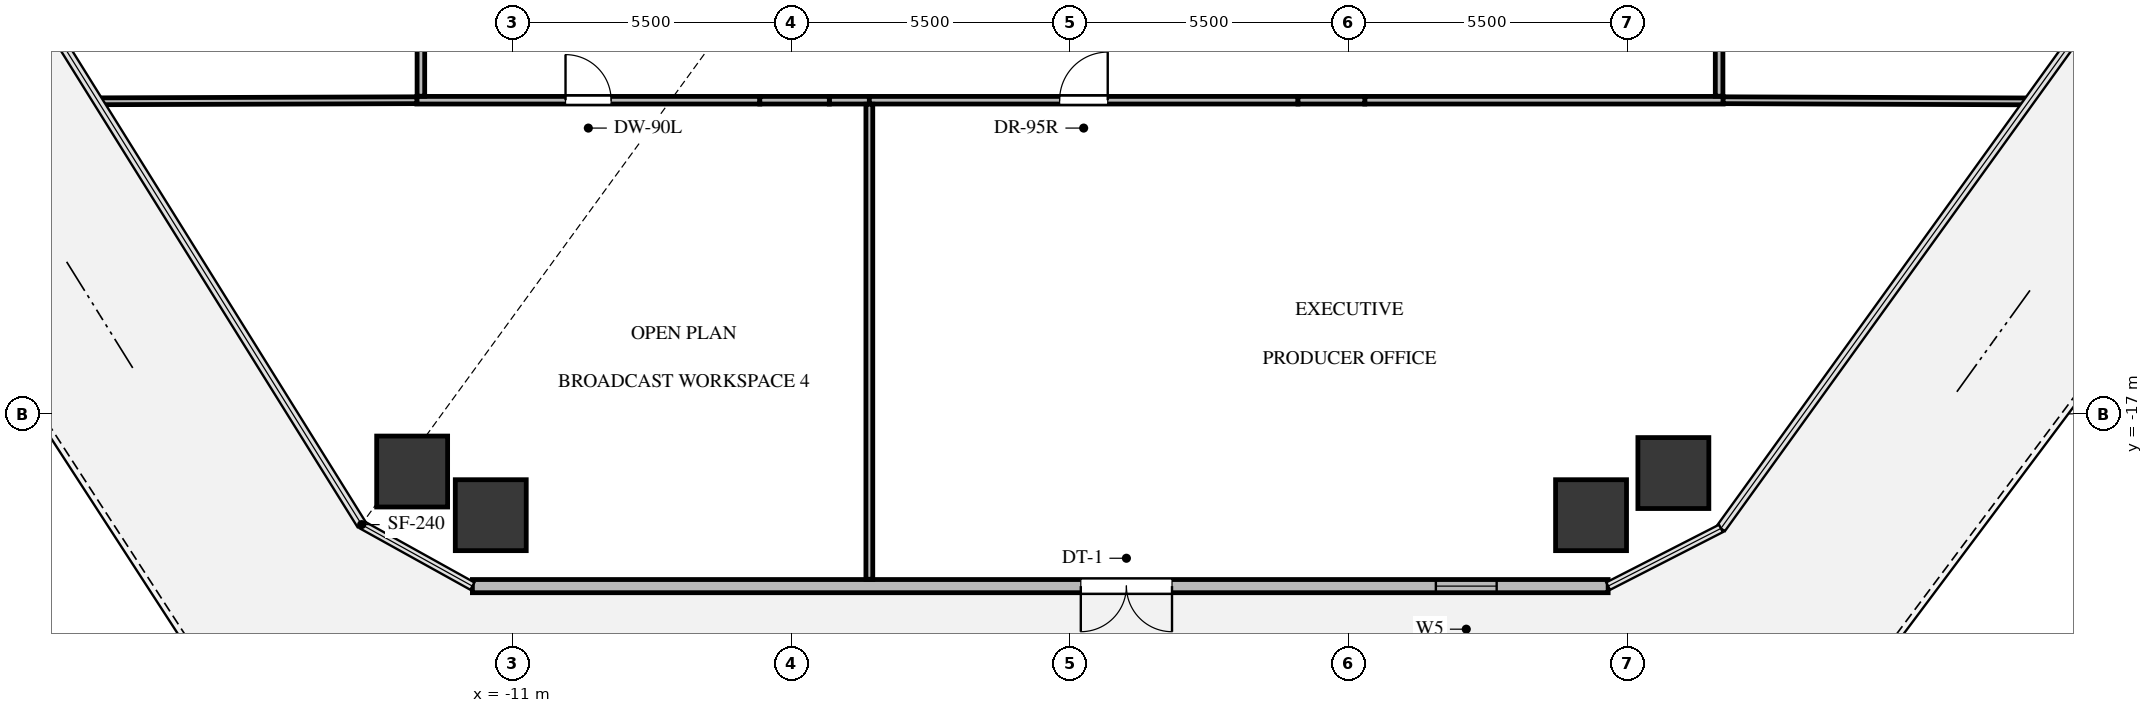
"""IFC4 building model, lengths in metres.
Left out: names, types, materials, properties, quantities, classifications, styles, units other than length and angle.
Written with IfcOpenShell. Run it as: python <this file> out.ifc"""

import sys

from ifc_helpers import new_model, si_unit, direction, frame, frame_2d, origin, origin_2d, place, context, subcontext, project, spatial, rectangle, extrude, source, transform, mapped, element, fill, save


model = new_model("IFC4")
c1 = context("Model", 3, precision=1e-05, world=origin(), true_north=direction((0.0, 1.0)))
c2 = subcontext(c1, "Body", "Model", "MODEL_VIEW")
j1 = project(units=[si_unit("LENGTHUNIT", "METRE"), si_unit("PLANEANGLEUNIT", "RADIAN")], contexts=[c1])
p1 = place(None, origin())
s1 = spatial("IfcSite", under=j1, at=p1, CompositionType="ELEMENT")
p2 = place(p1, origin())
s2 = spatial("IfcBuilding", under=s1, at=p2, CompositionType="ELEMENT")
p3 = place(p2, frame((0.0, 0.0, 32.4)))
s3 = spatial("IfcBuildingStorey", under=s2, at=p3, CompositionType="ELEMENT", Elevation=32.4)
m1 = source(origin(), c2, "Body", "SweptSolid", [
    extrude(rectangle(XDim=1.4, YDim=1.4, at=origin_2d()), origin(), (0.0, 0.0, 1.0), 3.3),
])
for number, where, z_axis, x_axis in (
    (1, (-12.983, -18.138, -0.24), (0.0, 0.0, 1.0), (1.0, 0.0, 0.0)),
    (2, (11.907, -18.168, -0.24), (0.0, 0.0, 1.0), (1.0, 0.0, 0.0)),
    (3, (10.283, -19.0, -0.24), (0.0, 0.0, 1.0), (1.0, 0.0, 0.0)),
    (4, (-11.431, -19.0, -0.24), (0.0, 0.0, 1.0), (1.0, 0.0, 0.0)),
):
    element("IfcColumn", number, at=place(p3, frame(where, z_axis=z_axis, x_axis=x_axis)), inside=s3, PredefinedType="COLUMN", context=c2, shape_type="MappedRepresentation", body=[
        mapped(m1, transform((0.0, 0.0, 0.0), x_axis=(1.0, 0.0, 0.0), y_axis=(0.0, 1.0, 0.0), z_axis=(0.0, 0.0, 1.0), scale=1.0)),
    ])
p4 = place(p3, frame((10.62, -20.4, 0.0), z_axis=(0.0, 0.0, 1.0), x_axis=(-1.0, 0.0, 0.0)))
e5 = element("IfcWall", 5, at=p4, inside=s3, PredefinedType="SOLIDWALL", context=c2, shape_type="SweptSolid", body=[
    extrude(rectangle(XDim=22.414, YDim=0.26, at=frame_2d((11.207, 0.0))), origin(), (0.0, 0.0, 1.0), 3.06),
])
p5 = place(p4, frame((8.607, 0.0, 0.0)))
e6 = element("IfcOpeningElement", 6, at=p5, cuts=e5, PredefinedType="OPENING", context=c2, shape_type="SweptSolid", body=[
    extrude(rectangle(XDim=1.8, YDim=2.3, at=frame_2d((0.9, 1.15))), frame((0.0, 0.14, 0.0), z_axis=(0.0, -1.0, 0.0), x_axis=(1.0, 0.0, 0.0)), (0.0, 0.0, 1.0), 0.28),
])
p6 = place(p4, frame((2.2, 0.0, 0.65)))
e7 = element("IfcOpeningElement", 7, at=p6, cuts=e5, PredefinedType="OPENING", context=c2, shape_type="SweptSolid", body=[
    extrude(rectangle(XDim=1.2, YDim=1.5, at=frame_2d((0.6, 0.75))), frame((0.0, 0.14, 0.0), z_axis=(0.0, -1.0, 0.0), x_axis=(1.0, 0.0, 0.0)), (0.0, 0.0, 1.0), 0.28),
])
p7 = place(p3, frame((-12.89, -10.81, 0.0), z_axis=(0.0, 0.0, 1.0), x_axis=(1.0, 0.0, 0.0)))
e8 = element("IfcWall", 8, at=p7, inside=s3, PredefinedType="PARTITIONING", context=c2, shape_type="SweptSolid", body=[
    extrude(rectangle(XDim=6.768, YDim=0.15, at=frame_2d((3.384, 0.0))), origin(), (0.0, 0.0, 1.0), 2.13),
])
p8 = place(p7, frame((2.934, 0.0, 0.0)))
e9 = element("IfcOpeningElement", 9, at=p8, cuts=e8, PredefinedType="OPENING", context=c2, shape_type="SweptSolid", body=[
    extrude(rectangle(XDim=0.9, YDim=2.05, at=frame_2d((0.45, 1.025))), frame((0.0, 0.085, 0.0), z_axis=(0.0, -1.0, 0.0), x_axis=(1.0, 0.0, 0.0)), (0.0, 0.0, 1.0), 0.17),
])
p9 = place(p3, frame((-4.75, -10.81, 0.0), z_axis=(0.0, 0.0, 1.0), x_axis=(1.0, 0.0, 0.0)))
e10 = element("IfcWall", 10, at=p9, inside=s3, PredefinedType="PARTITIONING", context=c2, shape_type="SweptSolid", body=[
    extrude(rectangle(XDim=0.79, YDim=0.15, at=frame_2d((0.395, 0.0))), origin(), (0.0, 0.0, 1.0), 3.045),
])
p10 = place(p3, frame((-6.122, -10.81, 0.0), z_axis=(0.0, 0.0, 1.0), x_axis=(1.0, 0.0, 0.0)))
e11 = element("IfcWall", 11, at=p10, inside=s3, PredefinedType="PARTITIONING", context=c2, shape_type="SweptSolid", body=[
    extrude(rectangle(XDim=1.372, YDim=0.15, at=frame_2d((0.686, 0.0))), origin(), (0.0, 0.0, 1.0), 2.13),
])
p11 = place(p3, frame((-3.96, -10.81, 0.0), z_axis=(0.0, 0.0, 1.0), x_axis=(1.0, 0.0, 0.0)))
e12 = element("IfcWall", 12, at=p11, inside=s3, PredefinedType="PARTITIONING", context=c2, shape_type="SweptSolid", body=[
    extrude(rectangle(XDim=8.459, YDim=0.15, at=frame_2d((4.229, 0.0))), origin(), (0.0, 0.0, 1.0), 2.598),
])
p12 = place(p11, frame((3.755, 0.0, 0.0)))
e13 = element("IfcOpeningElement", 13, at=p12, cuts=e12, PredefinedType="OPENING", context=c2, shape_type="SweptSolid", body=[
    extrude(rectangle(XDim=0.95, YDim=2.1, at=frame_2d((0.475, 1.05))), frame((0.0, 0.085, 0.0), z_axis=(0.0, -1.0, 0.0), x_axis=(1.0, 0.0, 0.0)), (0.0, 0.0, 1.0), 0.17),
])
p13 = place(p3, frame((5.817, -10.81, 0.0), z_axis=(0.0, 0.0, 1.0), x_axis=(1.0, 0.0, 0.0)))
e14 = element("IfcWall", 14, at=p13, inside=s3, PredefinedType="PARTITIONING", context=c2, shape_type="SweptSolid", body=[
    extrude(rectangle(XDim=7.073, YDim=0.15, at=frame_2d((3.536, 0.0))), origin(), (0.0, 0.0, 1.0), 2.13),
])
p14 = place(p3, frame((4.499, -10.81, 0.0), z_axis=(0.0, 0.0, 1.0), x_axis=(1.0, 0.0, 0.0)))
e15 = element("IfcWall", 15, at=p14, inside=s3, PredefinedType="PARTITIONING", context=c2, shape_type="SweptSolid", body=[
    extrude(rectangle(XDim=1.318, YDim=0.15, at=frame_2d((0.659, 0.0))), origin(), (0.0, 0.0, 1.0), 2.13),
])
p15 = place(p3, frame((-12.81, 1.682, 0.0), z_axis=(0.0, 0.0, 1.0), x_axis=(0.0, -1.0, 0.0)))
e16 = element("IfcWall", 16, at=p15, inside=s3, PredefinedType="PARTITIONING", context=c2, shape_type="SweptSolid", body=[
    extrude(rectangle(XDim=12.413, YDim=0.15, at=frame_2d((6.207, 0.0))), origin(), (0.0, 0.0, 1.0), 3.045),
])
p16 = place(p15, frame((5.747, 0.0, 0.0)))
e17 = element("IfcOpeningElement", 17, at=p16, cuts=e16, PredefinedType="OPENING", context=c2, shape_type="SweptSolid", body=[
    extrude(rectangle(XDim=0.92, YDim=2.1, at=frame_2d((0.46, 1.05))), frame((0.0, 0.085, 0.0), z_axis=(0.0, -1.0, 0.0), x_axis=(1.0, 0.0, 0.0)), (0.0, 0.0, 1.0), 0.17),
])
p17 = place(p3, frame((12.81, -10.731, 0.0), z_axis=(0.0, 0.0, 1.0), x_axis=(0.0, 1.0, 0.0)))
e18 = element("IfcWall", 18, at=p17, inside=s3, PredefinedType="PARTITIONING", context=c2, shape_type="SweptSolid", body=[
    extrude(rectangle(XDim=2.291, YDim=0.15, at=frame_2d((1.146, 0.0))), origin(), (0.0, 0.0, 1.0), 3.045),
])
p18 = place(p3, frame((-3.96, -10.889, 0.0), z_axis=(0.0, 0.0, 1.0), x_axis=(0.0, -1.0, 0.0)))
e19 = element("IfcWall", 19, at=p18, inside=s3, PredefinedType="PARTITIONING", context=c2, shape_type="SweptSolid", body=[
    extrude(rectangle(XDim=9.376, YDim=0.135, at=frame_2d((4.688, 0.0))), origin(), (0.0, 0.0, 1.0), 2.38),
])
p19 = place(p3, frame((-19.182, -10.831, 0.0), z_axis=(0.0, 0.0, 1.0), x_axis=(0.999994432845, 0.003336806783, 0.0)))
e20 = element("IfcWall", 20, at=p19, inside=s3, PredefinedType="PARTITIONING", context=c2, shape_type="SweptSolid", body=[
    extrude(rectangle(XDim=6.292, YDim=0.135, at=frame_2d((3.146, 0.0))), origin(), (0.0, 0.0, 1.0), 2.38),
])
p20 = place(p3, frame((12.89, -10.81, 0.0), z_axis=(0.0, 0.0, 1.0), x_axis=(0.999992607823, -0.003845035728, 0.0)))
e21 = element("IfcWall", 21, at=p20, inside=s3, PredefinedType="PARTITIONING", context=c2, shape_type="SweptSolid", body=[
    extrude(rectangle(XDim=6.032, YDim=0.135, at=frame_2d((3.016, 0.0))), origin(), (0.0, 0.0, 1.0), 2.38),
])
m2 = source(origin(), c2, "Body", "SweptSolid", [
    extrude(rectangle(XDim=1.8, YDim=2.3, at=frame_2d((0.9, 1.15))), frame((0.0, 0.025, 0.0), z_axis=(0.0, -1.0, 0.0), x_axis=(1.0, 0.0, 0.0)), (0.0, 0.0, 1.0), 0.05),
])
p21 = place(p5, origin())
e22 = element("IfcDoor", 22, at=p21, inside=s3, OperationType="DOUBLE_DOOR_SINGLE_SWING", PredefinedType="DOOR", context=c2, shape_type="MappedRepresentation", body=[
    mapped(m2, transform((0.0, 0.0, 0.0), x_axis=(1.0, 0.0, 0.0), y_axis=(0.0, 1.0, 0.0), z_axis=(0.0, 0.0, 1.0), scale=1.0)),
])
fill(e6, e22)
m3 = source(origin(), c2, "Body", "SweptSolid", [
    extrude(rectangle(XDim=1.2, YDim=1.5, at=frame_2d((0.6, 0.75))), frame((0.0, 0.03, 0.0), z_axis=(0.0, -1.0, 0.0), x_axis=(1.0, 0.0, 0.0)), (0.0, 0.0, 1.0), 0.06),
])
p22 = place(p6, origin())
e23 = element("IfcWindow", 23, at=p22, inside=s3, PartitioningType="SINGLE_PANEL", PredefinedType="WINDOW", context=c2, shape_type="MappedRepresentation", body=[
    mapped(m3, transform((0.0, 0.0, 0.0), x_axis=(1.0, 0.0, 0.0), y_axis=(0.0, 1.0, 0.0), z_axis=(0.0, 0.0, 1.0), scale=1.0)),
])
fill(e7, e23)
m4 = source(origin(), c2, "Body", "SweptSolid", [
    extrude(rectangle(XDim=0.9, YDim=2.05, at=frame_2d((0.45, 1.025))), frame((0.0, 0.025, 0.0), z_axis=(0.0, -1.0, 0.0), x_axis=(1.0, 0.0, 0.0)), (0.0, 0.0, 1.0), 0.05),
])
p23 = place(p8, origin())
e24 = element("IfcDoor", 24, at=p23, inside=s3, OperationType="SINGLE_SWING_LEFT", PredefinedType="DOOR", context=c2, shape_type="MappedRepresentation", body=[
    mapped(m4, transform((0.0, 0.0, 0.0), x_axis=(1.0, 0.0, 0.0), y_axis=(0.0, 1.0, 0.0), z_axis=(0.0, 0.0, 1.0), scale=1.0)),
])
fill(e9, e24)
m5 = source(origin(), c2, "Body", "SweptSolid", [
    extrude(rectangle(XDim=0.95, YDim=2.1, at=frame_2d((0.475, 1.05))), frame((0.0, 0.025, 0.0), z_axis=(0.0, -1.0, 0.0), x_axis=(1.0, 0.0, 0.0)), (0.0, 0.0, 1.0), 0.05),
])
p24 = place(p12, origin())
e25 = element("IfcDoor", 25, at=p24, inside=s3, OperationType="SINGLE_SWING_RIGHT", PredefinedType="DOOR", context=c2, shape_type="MappedRepresentation", body=[
    mapped(m5, transform((0.0, 0.0, 0.0), x_axis=(1.0, 0.0, 0.0), y_axis=(0.0, 1.0, 0.0), z_axis=(0.0, 0.0, 1.0), scale=1.0)),
])
fill(e13, e25)
save(model, sys.argv[1])
